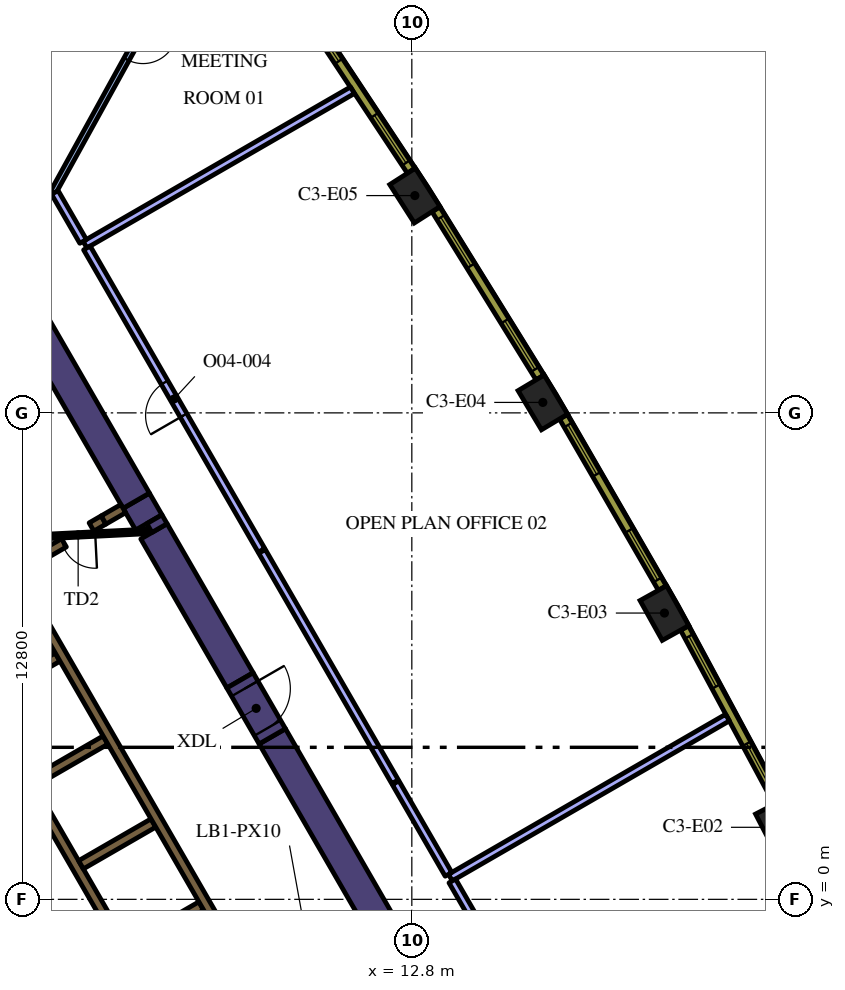
"""IFC4 building model, lengths in metres.
Left out: names, types, materials, properties, quantities, classifications, styles, units other than length and angle.
Written with IfcOpenShell. Run it as: python <this file> out.ifc"""

import sys

from ifc_helpers import new_model, si_unit, direction, frame, frame_2d, origin, origin_2d, place, context, subcontext, project, spatial, polyline, rectangle, outline, extrude, element, fill, save


model = new_model("IFC4")
c1 = context("Model", 3, precision=1e-05, world=origin(), true_north=direction((0.0, 1.0)))
c2 = subcontext(c1, "Body", "Model", "MODEL_VIEW")
j1 = project(units=[si_unit("LENGTHUNIT", "METRE"), si_unit("PLANEANGLEUNIT", "RADIAN")], contexts=[c1])
p1 = place(None, origin())
s1 = spatial("IfcSite", under=j1, at=p1, CompositionType="ELEMENT")
p2 = place(p1, origin())
s2 = spatial("IfcBuilding", under=s1, at=p2, CompositionType="ELEMENT")
p3 = place(p2, frame((0.0, 0.0, 179.4)))
s3 = spatial("IfcBuildingStorey", under=s2, at=p3, CompositionType="ELEMENT", Elevation=179.4)
for number, where, z_axis, x_axis in (
    (1, (22.476, 1.896, 0.0), (0.0, 0.0, 1.0), (-0.46, 0.888, 0.0)),
    (2, (19.447, 7.533, 0.0), (0.0, 0.0, 1.0), (-0.487, 0.874, 0.0)),
    (3, (16.247, 13.075, 0.0), (0.0, 0.0, 1.0), (-0.513, 0.858, 0.0)),
    (4, (12.88, 18.517, 0.0), (0.0, 0.0, 1.0), (-0.539, 0.842, 0.0)),
):
    element("IfcColumn", number, at=place(p3, frame(where, z_axis=z_axis, x_axis=x_axis)), inside=s3, PredefinedType="COLUMN", context=c2, shape_type="SweptSolid", body=[
        extrude(rectangle(XDim=1.2, YDim=0.8, at=origin_2d()), origin(), (0.0, 0.0, 1.0), 4.2),
    ])
p4 = place(p3, frame((9.129, 4.289, 0.0), z_axis=(0.0, 0.0, 1.0), x_axis=(0.499995742806, -0.866027861663, 0.0)))
e5 = element("IfcWall", 5, at=p4, inside=s3, PredefinedType="SOLIDWALL", context=c2, shape_type="SweptSolid", body=[
    extrude(rectangle(XDim=12.527, YDim=0.8, at=frame_2d((6.264, 0.0))), origin(), (0.0, 0.0, 1.0), 4.2),
])
p5 = place(p3, frame((5.878, 9.918, 0.0), z_axis=(0.0, 0.0, 1.0), x_axis=(-0.499893918903, 0.866086641072, 0.0)))
e6 = element("IfcWall", 6, at=p5, inside=s3, PredefinedType="SOLIDWALL", context=c2, shape_type="SweptSolid", body=[
    extrude(rectangle(XDim=0.657, YDim=0.8, at=frame_2d((0.329, 0.0))), origin(), (0.0, 0.0, 1.0), 4.2),
])
p6 = place(p3, frame((8.279, 5.761, 0.0), z_axis=(0.0, 0.0, 1.0), x_axis=(-0.500024261398, 0.866011396007, 0.0)))
e7 = element("IfcWall", 7, at=p6, inside=s3, PredefinedType="SOLIDWALL", context=c2, shape_type="SweptSolid", body=[
    extrude(rectangle(XDim=4.528, YDim=0.8, at=frame_2d((2.264, 0.0))), origin(), (0.0, 0.0, 1.0), 4.2),
])
p7 = place(p3, origin())
e8 = element("IfcWall", 8, at=p7, inside=s3, PredefinedType="SOLIDWALL", context=c2, shape_type="SweptSolid", body=[
    extrude(outline(polyline([(5.961, 9.654), (5.827, 9.886), (6.226, 10.116), (6.36, 9.884), (5.961, 9.654)])), origin(), (0.0, 0.0, 1.0), 4.2),
])
p8 = place(p3, frame((5.549, 10.489, 0.0), z_axis=(0.0, 0.0, 1.0), x_axis=(-0.50001746176, 0.866015321998, 0.0)))
e9 = element("IfcWall", 9, at=p8, inside=s3, PredefinedType="SOLIDWALL", context=c2, shape_type="SweptSolid", body=[
    extrude(rectangle(XDim=7.068, YDim=0.8, at=frame_2d((3.534, 0.0))), origin(), (0.0, 0.0, 1.0), 4.2),
])
p9 = place(p3, frame((6.568, -3.627, 0.0), z_axis=(0.0, 0.0, 1.0), x_axis=(-0.499999455981, 0.866025717874, 0.0)))
e10 = element("IfcWall", 10, at=p9, inside=s3, PredefinedType="SOLIDWALL", context=c2, shape_type="SweptSolid", body=[
    extrude(rectangle(XDim=11.978, YDim=0.25, at=frame_2d((5.989, 0.0))), origin(), (0.0, 0.0, 1.0), 4.2),
])
p10 = place(p3, frame((3.647, 9.38, 0.0), z_axis=(0.0, 0.0, 1.0), x_axis=(-0.866025015791, -0.500000672024, 0.0)))
e11 = element("IfcWall", 11, at=p10, inside=s3, PredefinedType="SOLIDWALL", context=c2, shape_type="SweptSolid", body=[
    extrude(rectangle(XDim=3.849, YDim=0.25, at=frame_2d((1.924, 0.0))), origin(), (0.0, 0.0, 1.0), 4.2),
])
p11 = place(p3, frame((1.574, 5.274, 0.0), z_axis=(0.0, 0.0, 1.0), x_axis=(0.866028486751, 0.499994660107, 0.0)))
e12 = element("IfcWall", 12, at=p11, inside=s3, PredefinedType="SOLIDWALL", context=c2, shape_type="SweptSolid", body=[
    extrude(rectangle(XDim=2.2, YDim=0.25, at=frame_2d((1.1, 0.0))), origin(), (0.0, 0.0, 1.0), 4.2),
])
for number, where, z_axis, x_axis in (
    (13, (2.834, 3.091, 0.0), (0.0, 0.0, 1.0), (0.866, 0.5, 0.0)),
    (14, (4.094, 0.909, 0.0), (0.0, 0.0, 1.0), (0.866, 0.5, 0.0)),
    (15, (5.354, -1.274, 0.0), (0.0, 0.0, 1.0), (0.866, 0.5, 0.0)),
):
    element("IfcWall", number, at=place(p3, frame(where, z_axis=z_axis, x_axis=x_axis)), inside=s3, PredefinedType="SOLIDWALL", context=c2, shape_type="SweptSolid", body=[
        extrude(rectangle(XDim=2.2, YDim=0.25, at=frame_2d((1.1, 0.0))), origin(), (0.0, 0.0, 1.0), 4.2),
    ])
p12 = place(p3, frame((4.688, 9.981, 0.0), z_axis=(0.0, 0.0, 1.0), x_axis=(-0.865974312977, -0.500088481434, 0.0)))
e16 = element("IfcWall", 16, at=p12, inside=s3, PredefinedType="SOLIDWALL", context=c2, shape_type="SweptSolid", body=[
    extrude(rectangle(XDim=0.366, YDim=0.25, at=frame_2d((0.183, 0.0))), origin(), (0.0, 0.0, 1.0), 4.2),
])
p13 = place(p3, frame((4.689, 9.982, 0.0), z_axis=(0.0, 0.0, 1.0), x_axis=(0.865947592822, 0.500134748329, 0.0)))
e17 = element("IfcWall", 17, at=p13, inside=s3, PredefinedType="SOLIDWALL", context=c2, shape_type="SweptSolid", body=[
    extrude(rectangle(XDim=0.598, YDim=0.25, at=frame_2d((0.299, 0.0))), origin(), (0.0, 0.0, 1.0), 4.2),
])
p14 = place(p3, frame((8.565, -2.185, 0.0), z_axis=(0.0, 0.0, 1.0), x_axis=(-0.499997954832, 0.866026584559, 0.0)))
e18 = element("IfcWall", 18, at=p14, inside=s3, PredefinedType="SOLIDWALL", context=c2, shape_type="SweptSolid", body=[
    extrude(rectangle(XDim=12.35, YDim=0.25, at=frame_2d((6.175, 0.0))), origin(), (0.0, 0.0, 1.0), 4.2),
])
p15 = place(p14, frame((0.585, 0.0, 0.0)))
e19 = element("IfcOpeningElement", 19, at=p15, cuts=e18, PredefinedType="OPENING", context=c2, shape_type="SweptSolid", body=[
    extrude(rectangle(XDim=1.1, YDim=2.1, at=frame_2d((0.55, 1.05))), frame((0.0, 0.135, 0.0), z_axis=(0.0, -1.0, 0.0), x_axis=(1.0, 0.0, 0.0)), (0.0, 0.0, 1.0), 0.27),
])
p16 = place(p3, frame((5.917, 9.684, 0.0), z_axis=(0.0, 0.0, 1.0), x_axis=(-0.998758194515, -0.049820366212, 0.0)))
e20 = element("IfcWall", 20, at=p16, inside=s3, PredefinedType="PARTITIONING", context=c2, shape_type="SweptSolid", body=[
    extrude(rectangle(XDim=2.7, YDim=0.12, at=frame_2d((1.35, 0.0))), origin(), (0.0, 0.0, 1.0), 3.15),
])
p17 = place(p16, frame((1.45, 0.0, 0.0)))
e21 = element("IfcOpeningElement", 21, at=p17, cuts=e20, PredefinedType="OPENING", context=c2, shape_type="SweptSolid", body=[
    extrude(rectangle(XDim=0.9, YDim=2.1, at=frame_2d((0.45, 1.05))), frame((0.0, 0.07, 0.0), z_axis=(0.0, -1.0, 0.0), x_axis=(1.0, 0.0, 0.0)), (0.0, 0.0, 1.0), 0.14),
])
p18 = place(p3, frame((8.279, 5.761, 0.0), z_axis=(0.0, 0.0, 1.0), x_axis=(0.500062241894, -0.865989465428, 0.0)))
e22 = element("IfcWall", 22, at=p18, inside=s3, PredefinedType="SOLIDWALL", context=c2, shape_type="SweptSolid", body=[
    extrude(rectangle(XDim=1.7, YDim=0.8, at=frame_2d((0.85, 0.0))), origin(), (0.0, 0.0, 1.0), 4.2),
])
p19 = place(p18, frame((0.25, 0.0, 0.0)))
e23 = element("IfcOpeningElement", 23, at=p19, cuts=e22, PredefinedType="OPENING", context=c2, shape_type="SweptSolid", body=[
    extrude(rectangle(XDim=1.2, YDim=2.1, at=frame_2d((0.6, 1.05))), frame((0.0, 0.41, 0.0), z_axis=(0.0, -1.0, 0.0), x_axis=(1.0, 0.0, 0.0)), (0.0, 0.0, 1.0), 0.82),
])
p20 = place(p3, frame((13.815, 0.572, 0.0), z_axis=(0.0, 0.0, 1.0), x_axis=(0.866036391575, 0.499980968105, 0.0)))
e24 = element("IfcWall", 24, at=p20, inside=s3, PredefinedType="PARTITIONING", context=c2, shape_type="SweptSolid", body=[
    extrude(rectangle(XDim=8.42, YDim=0.2, at=frame_2d((4.21, 0.0))), origin(), (0.0, 0.0, 1.0), 3.15),
])
p21 = place(p3, frame((17.796, -6.324, 0.0), z_axis=(0.0, 0.0, 1.0), x_axis=(-0.500026166427, 0.866010296064, 0.0)))
e25 = element("IfcWall", 25, at=p21, inside=s3, PredefinedType="PARTITIONING", context=c2, shape_type="SweptSolid", body=[
    extrude(rectangle(XDim=7.863, YDim=0.2, at=frame_2d((3.931, 0.0))), origin(), (0.0, 0.0, 1.0), 3.15),
])
p22 = place(p21, frame((3.4, 0.0, 0.0)))
e26 = element("IfcOpeningElement", 26, at=p22, cuts=e25, PredefinedType="OPENING", context=c2, shape_type="SweptSolid", body=[
    extrude(rectangle(XDim=1.0, YDim=2.1, at=frame_2d((0.5, 1.05))), frame((0.0, 0.11, 0.0), z_axis=(0.0, -1.0, 0.0), x_axis=(1.0, 0.0, 0.0)), (0.0, 0.0, 1.0), 0.22),
])
p23 = place(p3, frame((4.2, 17.226, 0.0), z_axis=(0.0, 0.0, 1.0), x_axis=(0.866021486214, 0.500006785369, 0.0)))
e27 = element("IfcWall", 27, at=p23, inside=s3, PredefinedType="PARTITIONING", context=c2, shape_type="SweptSolid", body=[
    extrude(rectangle(XDim=8.126, YDim=0.2, at=frame_2d((4.063, 0.0))), origin(), (0.0, 0.0, 1.0), 3.15),
])
p24 = place(p3, frame((12.359, 3.094, 0.0), z_axis=(0.0, 0.0, 1.0), x_axis=(-0.500010275428, 0.866019471182, 0.0)))
e28 = element("IfcWall", 28, at=p24, inside=s3, PredefinedType="PARTITIONING", context=c2, shape_type="SweptSolid", body=[
    extrude(rectangle(XDim=7.0, YDim=0.2, at=frame_2d((3.5, 0.0))), origin(), (0.0, 0.0, 1.0), 3.15),
])
p25 = place(p3, frame((8.844, 9.182, 0.0), z_axis=(0.0, 0.0, 1.0), x_axis=(-0.50000000053, 0.866025403479, 0.0)))
e29 = element("IfcWall", 29, at=p25, inside=s3, PredefinedType="PARTITIONING", context=c2, shape_type="SweptSolid", body=[
    extrude(rectangle(XDim=9.188, YDim=0.2, at=frame_2d((4.594, 0.0))), origin(), (0.0, 0.0, 1.0), 3.15),
])
p26 = place(p25, frame((4.1, 0.0, 0.0)))
e30 = element("IfcOpeningElement", 30, at=p26, cuts=e29, PredefinedType="OPENING", context=c2, shape_type="SweptSolid", body=[
    extrude(rectangle(XDim=1.0, YDim=2.1, at=frame_2d((0.5, 1.05))), frame((0.0, 0.11, 0.0), z_axis=(0.0, -1.0, 0.0), x_axis=(1.0, 0.0, 0.0)), (0.0, 0.0, 1.0), 0.22),
])
p27 = place(p3, frame((13.765, 0.659, 0.0), z_axis=(0.0, 0.0, 1.0), x_axis=(-0.500046568876, 0.865998515562, 0.0)))
e31 = element("IfcWall", 31, at=p27, inside=s3, PredefinedType="PARTITIONING", context=c2, shape_type="SweptSolid", body=[
    extrude(rectangle(XDim=2.782, YDim=0.2, at=frame_2d((1.391, 0.0))), origin(), (0.0, 0.0, 1.0), 3.15),
])
p28 = place(p3, frame((7.698, 26.465, 0.0), z_axis=(0.0, 0.0, 1.0), x_axis=(-0.482998301798, -0.875621288263, 0.0)))
e32 = element("IfcWall", 32, at=p28, inside=s3, PredefinedType="PARTITIONING", context=c2, shape_type="SweptSolid", body=[
    extrude(rectangle(XDim=8.982, YDim=0.15, at=frame_2d((4.491, 0.0))), origin(), (0.0, 0.0, 1.0), 3.15),
])
p29 = place(p28, frame((4.083, 0.0, 0.0)))
e33 = element("IfcOpeningElement", 33, at=p29, cuts=e32, PredefinedType="OPENING", context=c2, shape_type="SweptSolid", body=[
    extrude(rectangle(XDim=0.9, YDim=2.1, at=frame_2d((0.45, 1.05))), frame((0.0, 0.085, 0.0), z_axis=(0.0, -1.0, 0.0), x_axis=(1.0, 0.0, 0.0)), (0.0, 0.0, 1.0), 0.17),
])
p30 = place(p3, frame((4.15, 17.312, 0.0), z_axis=(0.0, 0.0, 1.0), x_axis=(-0.499935638681, 0.86606255962, 0.0)))
e34 = element("IfcWall", 34, at=p30, inside=s3, PredefinedType="PARTITIONING", context=c2, shape_type="SweptSolid", body=[
    extrude(rectangle(XDim=1.487, YDim=0.2, at=frame_2d((0.744, 0.0))), origin(), (0.0, 0.0, 1.0), 3.15),
])
p31 = place(p3, frame((22.44, 2.555, 0.0), z_axis=(0.0, 0.0, 1.0), x_axis=(-0.473349833294, 0.880874528704, 0.0)))
e35 = element("IfcWall", 35, at=p31, inside=s3, PredefinedType="SOLIDWALL", context=c2, shape_type="SweptSolid", body=[
    extrude(rectangle(XDim=5.204, YDim=0.24, at=frame_2d((2.602, 0.0))), origin(), (0.0, 0.0, 1.0), 3.95),
])
p32 = place(p31, frame((0.248, 0.0, 0.9)))
e36 = element("IfcOpeningElement", 36, at=p32, cuts=e35, PredefinedType="OPENING", context=c2, shape_type="SweptSolid", body=[
    extrude(rectangle(XDim=1.5, YDim=2.55, at=frame_2d((0.75, 1.275))), frame((0.0, 0.13, 0.0), z_axis=(0.0, -1.0, 0.0), x_axis=(1.0, 0.0, 0.0)), (0.0, 0.0, 1.0), 0.26),
])
p33 = place(p31, frame((3.455, 0.0, 0.9)))
e37 = element("IfcOpeningElement", 37, at=p33, cuts=e35, PredefinedType="OPENING", context=c2, shape_type="SweptSolid", body=[
    extrude(rectangle(XDim=1.5, YDim=2.55, at=frame_2d((0.75, 1.275))), frame((0.0, 0.13, 0.0), z_axis=(0.0, -1.0, 0.0), x_axis=(1.0, 0.0, 0.0)), (0.0, 0.0, 1.0), 0.26),
])
p34 = place(p3, frame((19.391, 8.191, 0.0), z_axis=(0.0, 0.0, 1.0), x_axis=(-0.500009456303, 0.866019944116, 0.0)))
e38 = element("IfcWall", 38, at=p34, inside=s3, PredefinedType="SOLIDWALL", context=c2, shape_type="SweptSolid", body=[
    extrude(rectangle(XDim=5.204, YDim=0.24, at=frame_2d((2.602, 0.0))), origin(), (0.0, 0.0, 1.0), 3.95),
])
p35 = place(p34, frame((0.248, 0.0, 0.9)))
e39 = element("IfcOpeningElement", 39, at=p35, cuts=e38, PredefinedType="OPENING", context=c2, shape_type="SweptSolid", body=[
    extrude(rectangle(XDim=1.5, YDim=2.55, at=frame_2d((0.75, 1.275))), frame((0.0, 0.13, 0.0), z_axis=(0.0, -1.0, 0.0), x_axis=(1.0, 0.0, 0.0)), (0.0, 0.0, 1.0), 0.26),
])
p36 = place(p34, frame((3.455, 0.0, 0.9)))
e40 = element("IfcOpeningElement", 40, at=p36, cuts=e38, PredefinedType="OPENING", context=c2, shape_type="SweptSolid", body=[
    extrude(rectangle(XDim=1.5, YDim=2.55, at=frame_2d((0.75, 1.275))), frame((0.0, 0.13, 0.0), z_axis=(0.0, -1.0, 0.0), x_axis=(1.0, 0.0, 0.0)), (0.0, 0.0, 1.0), 0.26),
])
p37 = place(p3, frame((16.171, 13.731, 0.0), z_axis=(0.0, 0.0, 1.0), x_axis=(-0.526197926587, 0.850362124072, 0.0)))
e41 = element("IfcWall", 41, at=p37, inside=s3, PredefinedType="SOLIDWALL", context=c2, shape_type="SweptSolid", body=[
    extrude(rectangle(XDim=5.203, YDim=0.24, at=frame_2d((2.602, 0.0))), origin(), (0.0, 0.0, 1.0), 3.95),
])
p38 = place(p37, frame((0.248, 0.0, 0.9)))
e42 = element("IfcOpeningElement", 42, at=p38, cuts=e41, PredefinedType="OPENING", context=c2, shape_type="SweptSolid", body=[
    extrude(rectangle(XDim=1.5, YDim=2.55, at=frame_2d((0.75, 1.275))), frame((0.0, 0.13, 0.0), z_axis=(0.0, -1.0, 0.0), x_axis=(1.0, 0.0, 0.0)), (0.0, 0.0, 1.0), 0.26),
])
p39 = place(p37, frame((3.455, 0.0, 0.9)))
e43 = element("IfcOpeningElement", 43, at=p39, cuts=e41, PredefinedType="OPENING", context=c2, shape_type="SweptSolid", body=[
    extrude(rectangle(XDim=1.5, YDim=2.55, at=frame_2d((0.75, 1.275))), frame((0.0, 0.13, 0.0), z_axis=(0.0, -1.0, 0.0), x_axis=(1.0, 0.0, 0.0)), (0.0, 0.0, 1.0), 0.26),
])
p40 = place(p3, frame((12.783, 19.171, 0.0), z_axis=(0.0, 0.0, 1.0), x_axis=(-0.551892811511, 0.833915058386, 0.0)))
e44 = element("IfcWall", 44, at=p40, inside=s3, PredefinedType="SOLIDWALL", context=c2, shape_type="SweptSolid", body=[
    extrude(rectangle(XDim=5.204, YDim=0.24, at=frame_2d((2.602, 0.0))), origin(), (0.0, 0.0, 1.0), 3.95),
])
p41 = place(p40, frame((0.248, 0.0, 0.9)))
e45 = element("IfcOpeningElement", 45, at=p41, cuts=e44, PredefinedType="OPENING", context=c2, shape_type="SweptSolid", body=[
    extrude(rectangle(XDim=1.5, YDim=2.55, at=frame_2d((0.75, 1.275))), frame((0.0, 0.13, 0.0), z_axis=(0.0, -1.0, 0.0), x_axis=(1.0, 0.0, 0.0)), (0.0, 0.0, 1.0), 0.26),
])
p42 = place(p40, frame((3.455, 0.0, 0.9)))
e46 = element("IfcOpeningElement", 46, at=p42, cuts=e44, PredefinedType="OPENING", context=c2, shape_type="SweptSolid", body=[
    extrude(rectangle(XDim=1.5, YDim=2.55, at=frame_2d((0.75, 1.275))), frame((0.0, 0.13, 0.0), z_axis=(0.0, -1.0, 0.0), x_axis=(1.0, 0.0, 0.0)), (0.0, 0.0, 1.0), 0.26),
])
p43 = place(p17, origin())
e47 = element("IfcDoor", 47, at=p43, inside=s3, OperationType="SINGLE_SWING_LEFT", PredefinedType="DOOR", context=c2, shape_type="SweptSolid", body=[
    extrude(rectangle(XDim=0.9, YDim=2.1, at=frame_2d((0.45, 1.05))), frame((0.0, 0.025, 0.0), z_axis=(0.0, -1.0, 0.0), x_axis=(1.0, 0.0, 0.0)), (0.0, 0.0, 1.0), 0.05),
])
fill(e21, e47)
p44 = place(p19, origin())
e48 = element("IfcDoor", 48, at=p44, inside=s3, OperationType="SINGLE_SWING_LEFT", PredefinedType="DOOR", context=c2, shape_type="SweptSolid", body=[
    extrude(rectangle(XDim=1.2, YDim=2.1, at=frame_2d((0.6, 1.05))), frame((0.0, 0.025, 0.0), z_axis=(0.0, -1.0, 0.0), x_axis=(1.0, 0.0, 0.0)), (0.0, 0.0, 1.0), 0.05),
])
fill(e23, e48)
p45 = place(p26, origin())
e49 = element("IfcDoor", 49, at=p45, inside=s3, OperationType="SINGLE_SWING_RIGHT", PredefinedType="DOOR", context=c2, shape_type="SweptSolid", body=[
    extrude(rectangle(XDim=1.0, YDim=2.1, at=frame_2d((0.5, 1.05))), frame((0.0, 0.025, 0.0), z_axis=(0.0, -1.0, 0.0), x_axis=(1.0, 0.0, 0.0)), (0.0, 0.0, 1.0), 0.05),
])
fill(e30, e49)
p46 = place(p29, origin())
e50 = element("IfcDoor", 50, at=p46, inside=s3, OperationType="SINGLE_SWING_RIGHT", PredefinedType="DOOR", context=c2, shape_type="SweptSolid", body=[
    extrude(rectangle(XDim=0.9, YDim=2.1, at=frame_2d((0.45, 1.05))), frame((0.0, 0.025, 0.0), z_axis=(0.0, -1.0, 0.0), x_axis=(1.0, 0.0, 0.0)), (0.0, 0.0, 1.0), 0.05),
])
fill(e33, e50)
p47 = place(p32, origin())
e51 = element("IfcWindow", 51, at=p47, inside=s3, PartitioningType="SINGLE_PANEL", PredefinedType="WINDOW", context=c2, shape_type="SweptSolid", body=[
    extrude(rectangle(XDim=1.5, YDim=2.55, at=frame_2d((0.75, 1.275))), frame((0.0, 0.04, 0.0), z_axis=(0.0, -1.0, 0.0), x_axis=(1.0, 0.0, 0.0)), (0.0, 0.0, 1.0), 0.06),
])
fill(e36, e51)
p48 = place(p33, origin())
e52 = element("IfcWindow", 52, at=p48, inside=s3, PartitioningType="SINGLE_PANEL", PredefinedType="WINDOW", context=c2, shape_type="SweptSolid", body=[
    extrude(rectangle(XDim=1.5, YDim=2.55, at=frame_2d((0.75, 1.275))), frame((0.0, 0.04, 0.0), z_axis=(0.0, -1.0, 0.0), x_axis=(1.0, 0.0, 0.0)), (0.0, 0.0, 1.0), 0.06),
])
fill(e37, e52)
p49 = place(p35, origin())
e53 = element("IfcWindow", 53, at=p49, inside=s3, PartitioningType="SINGLE_PANEL", PredefinedType="WINDOW", context=c2, shape_type="SweptSolid", body=[
    extrude(rectangle(XDim=1.5, YDim=2.55, at=frame_2d((0.75, 1.275))), frame((0.0, 0.04, 0.0), z_axis=(0.0, -1.0, 0.0), x_axis=(1.0, 0.0, 0.0)), (0.0, 0.0, 1.0), 0.06),
])
fill(e39, e53)
p50 = place(p36, origin())
e54 = element("IfcWindow", 54, at=p50, inside=s3, PartitioningType="SINGLE_PANEL", PredefinedType="WINDOW", context=c2, shape_type="SweptSolid", body=[
    extrude(rectangle(XDim=1.5, YDim=2.55, at=frame_2d((0.75, 1.275))), frame((0.0, 0.04, 0.0), z_axis=(0.0, -1.0, 0.0), x_axis=(1.0, 0.0, 0.0)), (0.0, 0.0, 1.0), 0.06),
])
fill(e40, e54)
p51 = place(p38, origin())
e55 = element("IfcWindow", 55, at=p51, inside=s3, PartitioningType="SINGLE_PANEL", PredefinedType="WINDOW", context=c2, shape_type="SweptSolid", body=[
    extrude(rectangle(XDim=1.5, YDim=2.55, at=frame_2d((0.75, 1.275))), frame((0.0, 0.04, 0.0), z_axis=(0.0, -1.0, 0.0), x_axis=(1.0, 0.0, 0.0)), (0.0, 0.0, 1.0), 0.06),
])
fill(e42, e55)
p52 = place(p39, origin())
e56 = element("IfcWindow", 56, at=p52, inside=s3, PartitioningType="SINGLE_PANEL", PredefinedType="WINDOW", context=c2, shape_type="SweptSolid", body=[
    extrude(rectangle(XDim=1.5, YDim=2.55, at=frame_2d((0.75, 1.275))), frame((0.0, 0.04, 0.0), z_axis=(0.0, -1.0, 0.0), x_axis=(1.0, 0.0, 0.0)), (0.0, 0.0, 1.0), 0.06),
])
fill(e43, e56)
p53 = place(p41, origin())
e57 = element("IfcWindow", 57, at=p53, inside=s3, PartitioningType="SINGLE_PANEL", PredefinedType="WINDOW", context=c2, shape_type="SweptSolid", body=[
    extrude(rectangle(XDim=1.5, YDim=2.55, at=frame_2d((0.75, 1.275))), frame((0.0, 0.04, 0.0), z_axis=(0.0, -1.0, 0.0), x_axis=(1.0, 0.0, 0.0)), (0.0, 0.0, 1.0), 0.06),
])
fill(e45, e57)
p54 = place(p42, origin())
e58 = element("IfcWindow", 58, at=p54, inside=s3, PartitioningType="SINGLE_PANEL", PredefinedType="WINDOW", context=c2, shape_type="SweptSolid", body=[
    extrude(rectangle(XDim=1.5, YDim=2.55, at=frame_2d((0.75, 1.275))), frame((0.0, 0.04, 0.0), z_axis=(0.0, -1.0, 0.0), x_axis=(1.0, 0.0, 0.0)), (0.0, 0.0, 1.0), 0.06),
])
fill(e46, e58)
save(model, sys.argv[1])
